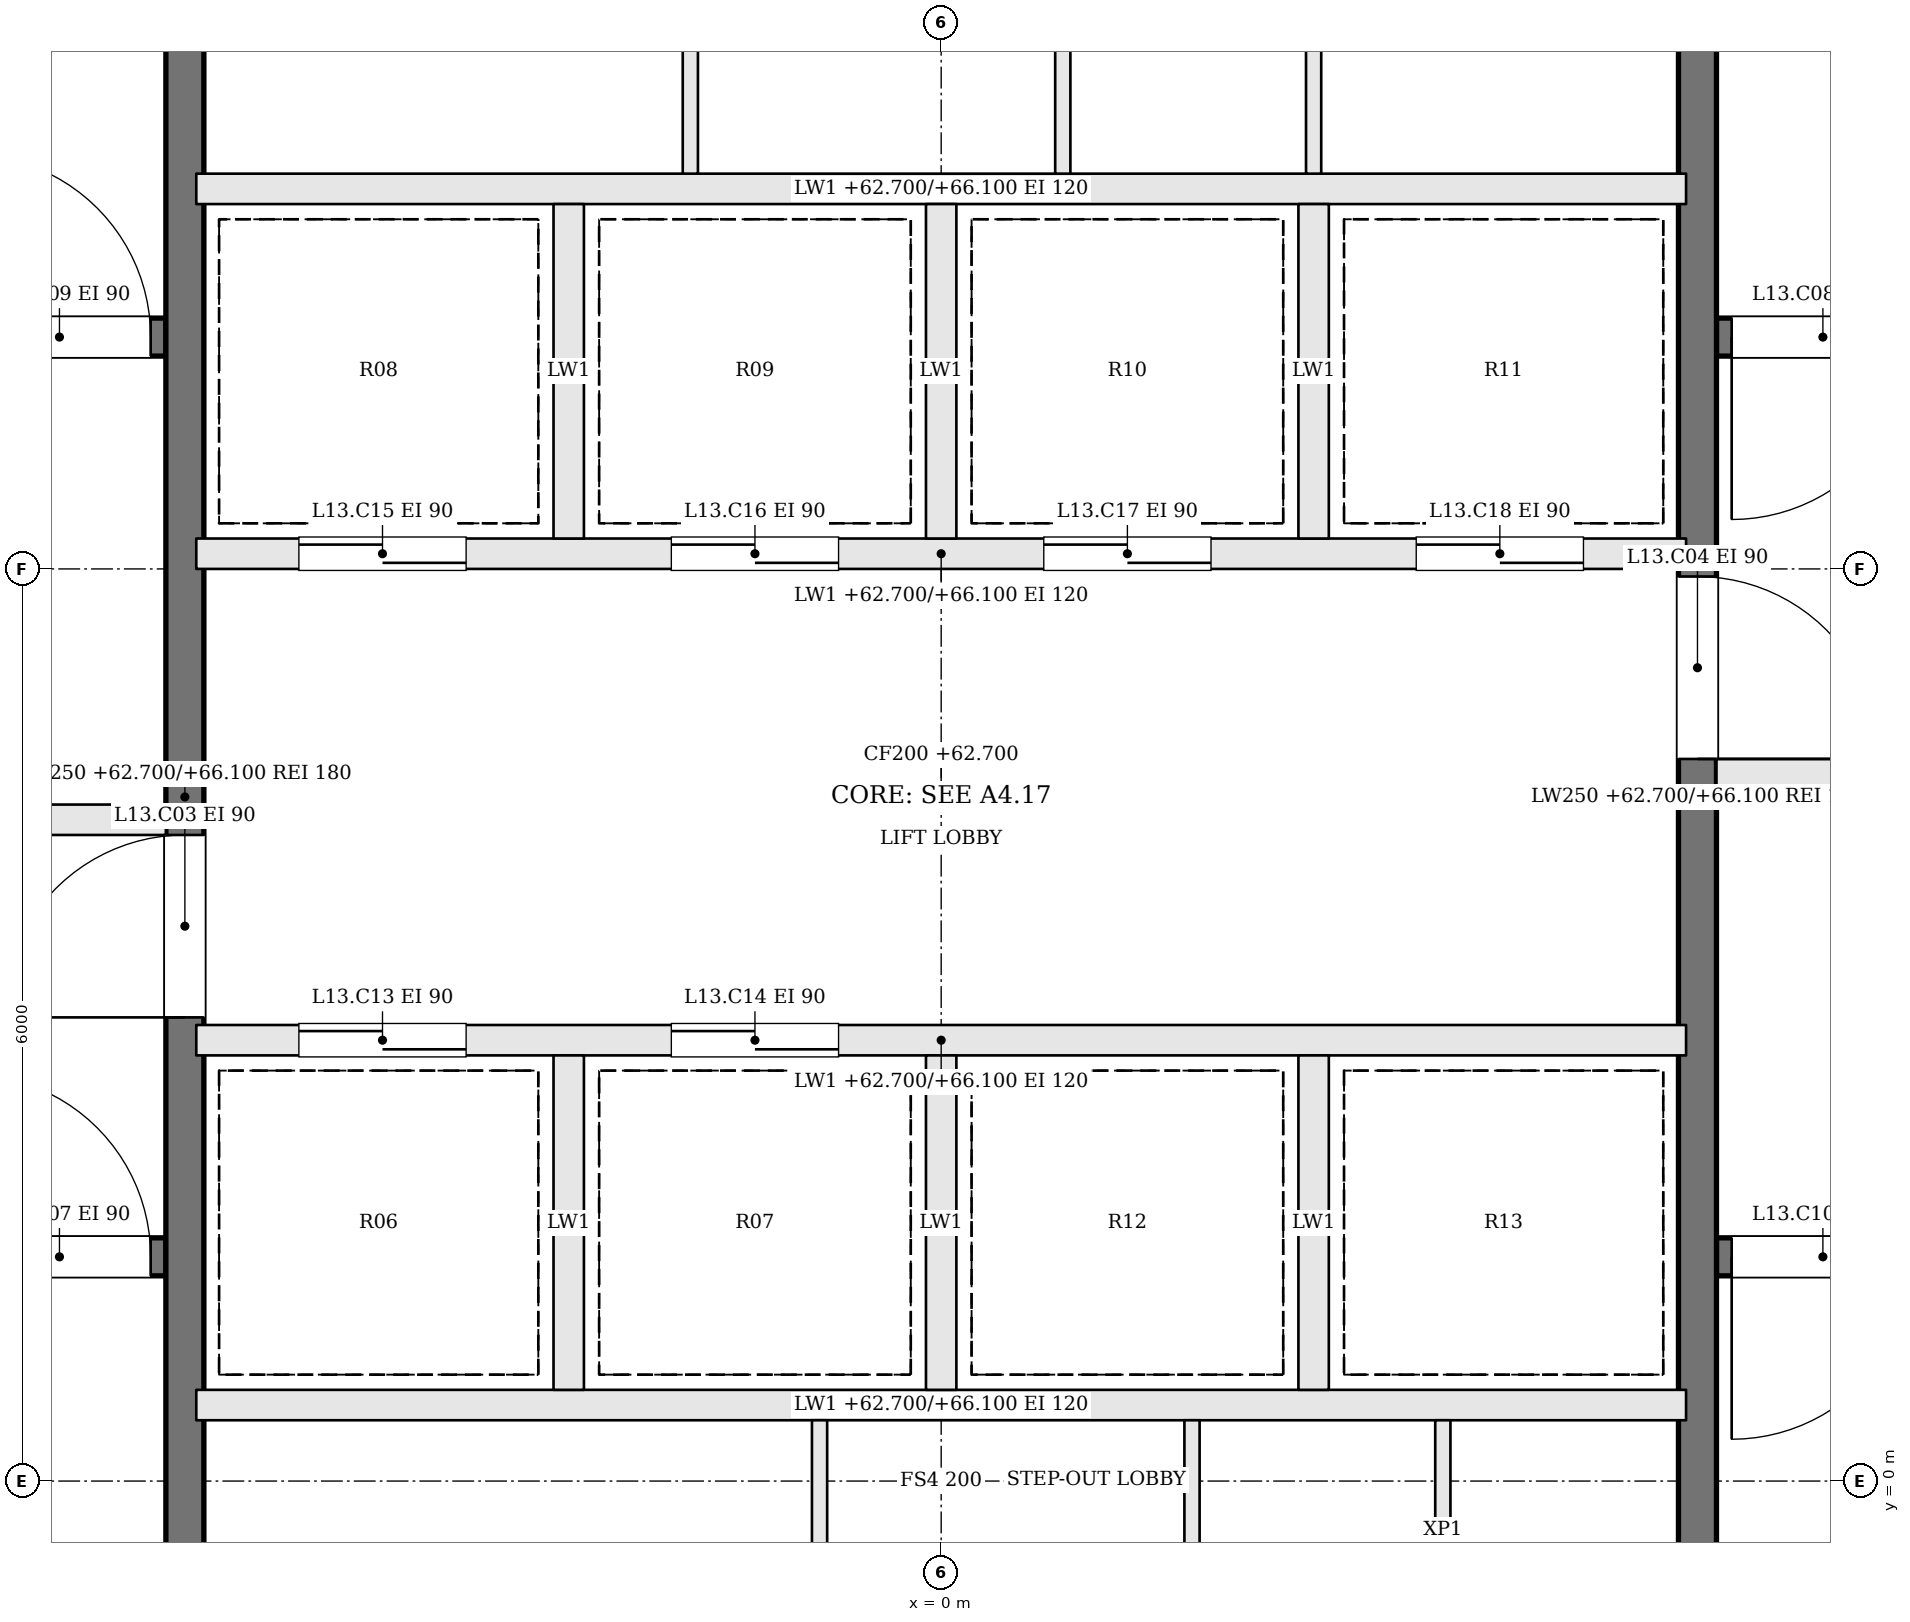
"""IFC4 building model, lengths in metres.
Left out: names, types, materials, properties, quantities, classifications, styles, units other than length and angle.
Written with IfcOpenShell. Run it as: python <this file> out.ifc"""

import sys

from ifc_helpers import new_model, si_unit, direction, frame, frame_2d, origin, place, context, subcontext, project, spatial, rectangle, extrude, element, fill, save


model = new_model("IFC4")
c1 = context("Model", 3, precision=1e-05, world=origin(), true_north=direction((0.0, 1.0)))
c2 = subcontext(c1, "Body", "Model", "MODEL_VIEW")
j1 = project(units=[si_unit("LENGTHUNIT", "METRE"), si_unit("PLANEANGLEUNIT", "RADIAN")], contexts=[c1])
p1 = place(None, origin())
s1 = spatial("IfcSite", under=j1, at=p1, CompositionType="ELEMENT")
p2 = place(p1, origin())
s2 = spatial("IfcBuilding", under=s1, at=p2, CompositionType="ELEMENT")
p3 = place(p2, frame((0.0, 0.0, 62.7)))
s3 = spatial("IfcBuildingStorey", under=s2, at=p3, CompositionType="ELEMENT", Elevation=62.7)
p4 = place(p3, frame((-11.6, 1.475, 0.0), z_axis=(0.0, 0.0, 1.0), x_axis=(1.0, 0.0, 0.0)))
e1 = element("IfcWall", 1, at=p4, inside=s3, PredefinedType="SOLIDWALL", context=c2, shape_type="SweptSolid", body=[
    extrude(rectangle(XDim=6.5, YDim=0.25, at=frame_2d((3.25, 0.0))), origin(), (0.0, 0.0, 1.0), 3.4),
])
p5 = place(p4, frame((5.2, 0.0, 0.0)))
e2 = element("IfcOpeningElement", 2, at=p5, cuts=e1, PredefinedType="OPENING", context=c2, shape_type="SweptSolid", body=[
    extrude(rectangle(XDim=1.2, YDim=2.1, at=frame_2d((0.6, 1.05))), frame((0.0, 0.135, 0.0), z_axis=(0.0, -1.0, 0.0), x_axis=(1.0, 0.0, 0.0)), (0.0, 0.0, 1.0), 0.27),
])
p6 = place(p3, frame((11.6, 7.525, 0.0), z_axis=(0.0, 0.0, 1.0), x_axis=(-1.0, 0.0, 0.0)))
e3 = element("IfcWall", 3, at=p6, inside=s3, PredefinedType="SOLIDWALL", context=c2, shape_type="SweptSolid", body=[
    extrude(rectangle(XDim=6.5, YDim=0.25, at=frame_2d((3.25, 0.0))), origin(), (0.0, 0.0, 1.0), 3.4),
])
p7 = place(p6, frame((5.2, 0.0, 0.0)))
e4 = element("IfcOpeningElement", 4, at=p7, cuts=e3, PredefinedType="OPENING", context=c2, shape_type="SweptSolid", body=[
    extrude(rectangle(XDim=1.2, YDim=2.1, at=frame_2d((0.6, 1.05))), frame((0.0, 0.135, 0.0), z_axis=(0.0, -1.0, 0.0), x_axis=(1.0, 0.0, 0.0)), (0.0, 0.0, 1.0), 0.27),
])
p8 = place(p3, frame((-11.6, 4.35, 0.0), z_axis=(0.0, 0.0, 1.0), x_axis=(1.0, 0.0, 0.0)))
e5 = element("IfcWall", 5, at=p8, inside=s3, PredefinedType="SOLIDWALL", context=c2, shape_type="SweptSolid", body=[
    extrude(rectangle(XDim=6.5, YDim=0.2, at=frame_2d((3.25, 0.0))), origin(), (0.0, 0.0, 1.0), 3.4),
])
p9 = place(p8, frame((3.8, 0.0, 0.0)))
e6 = element("IfcOpeningElement", 6, at=p9, cuts=e5, PredefinedType="OPENING", context=c2, shape_type="SweptSolid", body=[
    extrude(rectangle(XDim=1.2, YDim=2.1, at=frame_2d((0.6, 1.05))), frame((0.0, 0.11, 0.0), z_axis=(0.0, -1.0, 0.0), x_axis=(1.0, 0.0, 0.0)), (0.0, 0.0, 1.0), 0.22),
])
p10 = place(p8, frame((0.5, 0.0, 0.0)))
e7 = element("IfcOpeningElement", 7, at=p10, cuts=e5, PredefinedType="OPENING", context=c2, shape_type="SweptSolid", body=[
    extrude(rectangle(XDim=1.2, YDim=2.1, at=frame_2d((0.6, 1.05))), frame((0.0, 0.11, 0.0), z_axis=(0.0, -1.0, 0.0), x_axis=(1.0, 0.0, 0.0)), (0.0, 0.0, 1.0), 0.22),
])
p11 = place(p3, frame((11.6, 4.65, 0.0), z_axis=(0.0, 0.0, 1.0), x_axis=(-1.0, 0.0, 0.0)))
e8 = element("IfcWall", 8, at=p11, inside=s3, PredefinedType="SOLIDWALL", context=c2, shape_type="SweptSolid", body=[
    extrude(rectangle(XDim=6.5, YDim=0.2, at=frame_2d((3.25, 0.0))), origin(), (0.0, 0.0, 1.0), 3.4),
])
p12 = place(p11, frame((3.8, 0.0, 0.0)))
e9 = element("IfcOpeningElement", 9, at=p12, cuts=e8, PredefinedType="OPENING", context=c2, shape_type="SweptSolid", body=[
    extrude(rectangle(XDim=1.2, YDim=2.1, at=frame_2d((0.6, 1.05))), frame((0.0, 0.11, 0.0), z_axis=(0.0, -1.0, 0.0), x_axis=(1.0, 0.0, 0.0)), (0.0, 0.0, 1.0), 0.22),
])
p13 = place(p11, frame((0.5, 0.0, 0.0)))
e10 = element("IfcOpeningElement", 10, at=p13, cuts=e8, PredefinedType="OPENING", context=c2, shape_type="SweptSolid", body=[
    extrude(rectangle(XDim=1.2, YDim=2.1, at=frame_2d((0.6, 1.05))), frame((0.0, 0.11, 0.0), z_axis=(0.0, -1.0, 0.0), x_axis=(1.0, 0.0, 0.0)), (0.0, 0.0, 1.0), 0.22),
])
p14 = place(p3, frame((-11.6, 7.525, 0.0), z_axis=(0.0, 0.0, 1.0), x_axis=(1.0, 0.0, 0.0)))
e11 = element("IfcWall", 11, at=p14, inside=s3, PredefinedType="SOLIDWALL", context=c2, shape_type="SweptSolid", body=[
    extrude(rectangle(XDim=6.5, YDim=0.25, at=frame_2d((3.25, 0.0))), origin(), (0.0, 0.0, 1.0), 3.4),
])
p15 = place(p14, frame((5.2, 0.0, 0.0)))
e12 = element("IfcOpeningElement", 12, at=p15, cuts=e11, PredefinedType="OPENING", context=c2, shape_type="SweptSolid", body=[
    extrude(rectangle(XDim=1.2, YDim=2.1, at=frame_2d((0.6, 1.05))), frame((0.0, 0.135, 0.0), z_axis=(0.0, -1.0, 0.0), x_axis=(1.0, 0.0, 0.0)), (0.0, 0.0, 1.0), 0.27),
])
p16 = place(p3, frame((11.6, 1.475, 0.0), z_axis=(0.0, 0.0, 1.0), x_axis=(-1.0, 0.0, 0.0)))
e13 = element("IfcWall", 13, at=p16, inside=s3, PredefinedType="SOLIDWALL", context=c2, shape_type="SweptSolid", body=[
    extrude(rectangle(XDim=6.5, YDim=0.25, at=frame_2d((3.25, 0.0))), origin(), (0.0, 0.0, 1.0), 3.4),
])
p17 = place(p16, frame((5.2, 0.0, 0.0)))
e14 = element("IfcOpeningElement", 14, at=p17, cuts=e13, PredefinedType="OPENING", context=c2, shape_type="SweptSolid", body=[
    extrude(rectangle(XDim=1.2, YDim=2.1, at=frame_2d((0.6, 1.05))), frame((0.0, 0.135, 0.0), z_axis=(0.0, -1.0, 0.0), x_axis=(1.0, 0.0, 0.0)), (0.0, 0.0, 1.0), 0.27),
])
p18 = place(p3, frame((-4.975, -1.6, 0.0), z_axis=(0.0, 0.0, 1.0), x_axis=(0.0, 1.0, 0.0)))
e15 = element("IfcWall", 15, at=p18, inside=s3, PredefinedType="SOLIDWALL", context=c2, shape_type="SweptSolid", body=[
    extrude(rectangle(XDim=12.2, YDim=0.25, at=frame_2d((6.1, 0.0))), origin(), (0.0, 0.0, 1.0), 3.4),
])
p19 = place(p18, frame((4.65, 0.0, 0.0)))
e16 = element("IfcOpeningElement", 16, at=p19, cuts=e15, PredefinedType="OPENING", context=c2, shape_type="SweptSolid", body=[
    extrude(rectangle(XDim=1.2, YDim=2.1, at=frame_2d((0.6, 1.05))), frame((0.0, 0.135, 0.0), z_axis=(0.0, -1.0, 0.0), x_axis=(1.0, 0.0, 0.0)), (0.0, 0.0, 1.0), 0.27),
])
p20 = place(p3, frame((4.975, 10.6, 0.0), z_axis=(0.0, 0.0, 1.0), x_axis=(0.0, -1.0, 0.0)))
e17 = element("IfcWall", 17, at=p20, inside=s3, PredefinedType="SOLIDWALL", context=c2, shape_type="SweptSolid", body=[
    extrude(rectangle(XDim=12.2, YDim=0.25, at=frame_2d((6.1, 0.0))), origin(), (0.0, 0.0, 1.0), 3.4),
])
p21 = place(p20, frame((4.65, 0.0, 0.0)))
e18 = element("IfcOpeningElement", 18, at=p21, cuts=e17, PredefinedType="OPENING", context=c2, shape_type="SweptSolid", body=[
    extrude(rectangle(XDim=1.2, YDim=2.1, at=frame_2d((0.6, 1.05))), frame((0.0, 0.135, 0.0), z_axis=(0.0, -1.0, 0.0), x_axis=(1.0, 0.0, 0.0)), (0.0, 0.0, 1.0), 0.27),
])
p22 = place(p3, frame((-4.9, 0.5, 0.0), z_axis=(0.0, 0.0, 1.0), x_axis=(1.0, 0.0, 0.0)))
e19 = element("IfcWall", 19, at=p22, inside=s3, PredefinedType="SOLIDWALL", context=c2, shape_type="SweptSolid", body=[
    extrude(rectangle(XDim=9.8, YDim=0.2, at=frame_2d((4.9, 0.0))), origin(), (0.0, 0.0, 1.0), 3.4),
])
p23 = place(p3, frame((-4.9, 2.9, 0.0), z_axis=(0.0, 0.0, 1.0), x_axis=(1.0, 0.0, 0.0)))
e20 = element("IfcWall", 20, at=p23, inside=s3, PredefinedType="SOLIDWALL", context=c2, shape_type="SweptSolid", body=[
    extrude(rectangle(XDim=9.8, YDim=0.2, at=frame_2d((4.9, 0.0))), origin(), (0.0, 0.0, 1.0), 3.4),
])
p24 = place(p23, frame((0.675, 0.0, 0.0)))
e21 = element("IfcOpeningElement", 21, at=p24, cuts=e20, PredefinedType="OPENING", context=c2, shape_type="SweptSolid", body=[
    extrude(rectangle(XDim=1.1, YDim=2.1, at=frame_2d((0.55, 1.05))), frame((0.0, 0.11, 0.0), z_axis=(0.0, -1.0, 0.0), x_axis=(1.0, 0.0, 0.0)), (0.0, 0.0, 1.0), 0.22),
])
p25 = place(p23, frame((3.125, 0.0, 0.0)))
e22 = element("IfcOpeningElement", 22, at=p25, cuts=e20, PredefinedType="OPENING", context=c2, shape_type="SweptSolid", body=[
    extrude(rectangle(XDim=1.1, YDim=2.1, at=frame_2d((0.55, 1.05))), frame((0.0, 0.11, 0.0), z_axis=(0.0, -1.0, 0.0), x_axis=(1.0, 0.0, 0.0)), (0.0, 0.0, 1.0), 0.22),
])
p26 = place(p3, frame((-4.9, 6.1, 0.0), z_axis=(0.0, 0.0, 1.0), x_axis=(1.0, 0.0, 0.0)))
e23 = element("IfcWall", 23, at=p26, inside=s3, PredefinedType="SOLIDWALL", context=c2, shape_type="SweptSolid", body=[
    extrude(rectangle(XDim=9.8, YDim=0.2, at=frame_2d((4.9, 0.0))), origin(), (0.0, 0.0, 1.0), 3.4),
])
p27 = place(p26, frame((0.675, 0.0, 0.0)))
e24 = element("IfcOpeningElement", 24, at=p27, cuts=e23, PredefinedType="OPENING", context=c2, shape_type="SweptSolid", body=[
    extrude(rectangle(XDim=1.1, YDim=2.1, at=frame_2d((0.55, 1.05))), frame((0.0, 0.11, 0.0), z_axis=(0.0, -1.0, 0.0), x_axis=(1.0, 0.0, 0.0)), (0.0, 0.0, 1.0), 0.22),
])
p28 = place(p26, frame((3.125, 0.0, 0.0)))
e25 = element("IfcOpeningElement", 25, at=p28, cuts=e23, PredefinedType="OPENING", context=c2, shape_type="SweptSolid", body=[
    extrude(rectangle(XDim=1.1, YDim=2.1, at=frame_2d((0.55, 1.05))), frame((0.0, 0.11, 0.0), z_axis=(0.0, -1.0, 0.0), x_axis=(1.0, 0.0, 0.0)), (0.0, 0.0, 1.0), 0.22),
])
p29 = place(p26, frame((5.575, 0.0, 0.0)))
e26 = element("IfcOpeningElement", 26, at=p29, cuts=e23, PredefinedType="OPENING", context=c2, shape_type="SweptSolid", body=[
    extrude(rectangle(XDim=1.1, YDim=2.1, at=frame_2d((0.55, 1.05))), frame((0.0, 0.11, 0.0), z_axis=(0.0, -1.0, 0.0), x_axis=(1.0, 0.0, 0.0)), (0.0, 0.0, 1.0), 0.22),
])
p30 = place(p26, frame((8.025, 0.0, 0.0)))
e27 = element("IfcOpeningElement", 27, at=p30, cuts=e23, PredefinedType="OPENING", context=c2, shape_type="SweptSolid", body=[
    extrude(rectangle(XDim=1.1, YDim=2.1, at=frame_2d((0.55, 1.05))), frame((0.0, 0.11, 0.0), z_axis=(0.0, -1.0, 0.0), x_axis=(1.0, 0.0, 0.0)), (0.0, 0.0, 1.0), 0.22),
])
p31 = place(p3, frame((-4.9, 8.5, 0.0), z_axis=(0.0, 0.0, 1.0), x_axis=(1.0, 0.0, 0.0)))
e28 = element("IfcWall", 28, at=p31, inside=s3, PredefinedType="SOLIDWALL", context=c2, shape_type="SweptSolid", body=[
    extrude(rectangle(XDim=9.8, YDim=0.2, at=frame_2d((4.9, 0.0))), origin(), (0.0, 0.0, 1.0), 3.4),
])
for number, where, z_axis, x_axis in (
    (29, (-2.45, 0.6, 0.0), (0.0, 0.0, 1.0), (0.0, 1.0, 0.0)),
    (30, (0.0, 0.6, 0.0), (0.0, 0.0, 1.0), (0.0, 1.0, 0.0)),
    (31, (2.45, 0.6, 0.0), (0.0, 0.0, 1.0), (0.0, 1.0, 0.0)),
    (32, (-2.45, 6.2, 0.0), (0.0, 0.0, 1.0), (0.0, 1.0, 0.0)),
    (33, (0.0, 6.2, 0.0), (0.0, 0.0, 1.0), (0.0, 1.0, 0.0)),
    (34, (2.45, 6.2, 0.0), (0.0, 0.0, 1.0), (0.0, 1.0, 0.0)),
):
    element("IfcWall", number, at=place(p3, frame(where, z_axis=z_axis, x_axis=x_axis)), inside=s3, PredefinedType="SOLIDWALL", context=c2, shape_type="SweptSolid", body=[
        extrude(rectangle(XDim=2.2, YDim=0.2, at=frame_2d((1.1, 0.0))), origin(), (0.0, 0.0, 1.0), 3.4),
    ])
for number, where, z_axis, x_axis in (
    (35, (-0.8, -1.6, 0.0), (0.0, 0.0, 1.0), (0.0, 1.0, 0.0)),
    (36, (1.65, -1.6, 0.0), (0.0, 0.0, 1.0), (0.0, 1.0, 0.0)),
    (37, (3.3, -1.6, 0.0), (0.0, 0.0, 1.0), (0.0, 1.0, 0.0)),
    (38, (-1.65, 8.6, 0.0), (0.0, 0.0, 1.0), (0.0, 1.0, 0.0)),
    (39, (0.8, 8.6, 0.0), (0.0, 0.0, 1.0), (0.0, 1.0, 0.0)),
    (40, (2.45, 8.6, 0.0), (0.0, 0.0, 1.0), (0.0, 1.0, 0.0)),
):
    element("IfcWall", number, at=place(p3, frame(where, z_axis=z_axis, x_axis=x_axis)), inside=s3, PredefinedType="PARTITIONING", context=c2, shape_type="SweptSolid", body=[
        extrude(rectangle(XDim=2.0, YDim=0.1, at=frame_2d((1.0, 0.0))), origin(), (0.0, 0.0, 1.0), 3.4),
    ])
p32 = place(p19, origin())
e41 = element("IfcDoor", 41, at=p32, inside=s3, OperationType="SINGLE_SWING_LEFT", PredefinedType="DOOR", context=c2, shape_type="SweptSolid", body=[
    extrude(rectangle(XDim=1.2, YDim=2.1, at=frame_2d((0.6, 1.05))), frame((0.0, 0.025, 0.0), z_axis=(0.0, -1.0, 0.0), x_axis=(1.0, 0.0, 0.0)), (0.0, 0.0, 1.0), 0.05),
])
fill(e16, e41)
p33 = place(p21, origin())
e42 = element("IfcDoor", 42, at=p33, inside=s3, OperationType="SINGLE_SWING_RIGHT", PredefinedType="DOOR", context=c2, shape_type="SweptSolid", body=[
    extrude(rectangle(XDim=1.2, YDim=2.1, at=frame_2d((0.6, 1.05))), frame((0.0, 0.025, 0.0), z_axis=(0.0, -1.0, 0.0), x_axis=(1.0, 0.0, 0.0)), (0.0, 0.0, 1.0), 0.05),
])
fill(e18, e42)
p34 = place(p5, origin())
e43 = element("IfcDoor", 43, at=p34, inside=s3, OperationType="SINGLE_SWING_LEFT", PredefinedType="DOOR", context=c2, shape_type="SweptSolid", body=[
    extrude(rectangle(XDim=1.2, YDim=2.1, at=frame_2d((0.6, 1.05))), frame((0.0, 0.025, 0.0), z_axis=(0.0, -1.0, 0.0), x_axis=(1.0, 0.0, 0.0)), (0.0, 0.0, 1.0), 0.05),
])
fill(e2, e43)
p35 = place(p7, origin())
e44 = element("IfcDoor", 44, at=p35, inside=s3, OperationType="SINGLE_SWING_RIGHT", PredefinedType="DOOR", context=c2, shape_type="SweptSolid", body=[
    extrude(rectangle(XDim=1.2, YDim=2.1, at=frame_2d((0.6, 1.05))), frame((0.0, 0.025, 0.0), z_axis=(0.0, -1.0, 0.0), x_axis=(1.0, 0.0, 0.0)), (0.0, 0.0, 1.0), 0.05),
])
fill(e4, e44)
p36 = place(p15, origin())
e45 = element("IfcDoor", 45, at=p36, inside=s3, OperationType="SINGLE_SWING_LEFT", PredefinedType="DOOR", context=c2, shape_type="SweptSolid", body=[
    extrude(rectangle(XDim=1.2, YDim=2.1, at=frame_2d((0.6, 1.05))), frame((0.0, 0.025, 0.0), z_axis=(0.0, -1.0, 0.0), x_axis=(1.0, 0.0, 0.0)), (0.0, 0.0, 1.0), 0.05),
])
fill(e12, e45)
p37 = place(p17, origin())
e46 = element("IfcDoor", 46, at=p37, inside=s3, OperationType="SINGLE_SWING_RIGHT", PredefinedType="DOOR", context=c2, shape_type="SweptSolid", body=[
    extrude(rectangle(XDim=1.2, YDim=2.1, at=frame_2d((0.6, 1.05))), frame((0.0, 0.025, 0.0), z_axis=(0.0, -1.0, 0.0), x_axis=(1.0, 0.0, 0.0)), (0.0, 0.0, 1.0), 0.05),
])
fill(e14, e46)
p38 = place(p24, origin())
e47 = element("IfcDoor", 47, at=p38, inside=s3, OperationType="SLIDING_TO_RIGHT", PredefinedType="DOOR", context=c2, shape_type="SweptSolid", body=[
    extrude(rectangle(XDim=1.1, YDim=2.1, at=frame_2d((0.55, 1.05))), frame((0.0, 0.025, 0.0), z_axis=(0.0, -1.0, 0.0), x_axis=(1.0, 0.0, 0.0)), (0.0, 0.0, 1.0), 0.05),
])
fill(e21, e47)
p39 = place(p25, origin())
e48 = element("IfcDoor", 48, at=p39, inside=s3, OperationType="SLIDING_TO_LEFT", PredefinedType="DOOR", context=c2, shape_type="SweptSolid", body=[
    extrude(rectangle(XDim=1.1, YDim=2.1, at=frame_2d((0.55, 1.05))), frame((0.0, 0.025, 0.0), z_axis=(0.0, -1.0, 0.0), x_axis=(1.0, 0.0, 0.0)), (0.0, 0.0, 1.0), 0.05),
])
fill(e22, e48)
p40 = place(p27, origin())
e49 = element("IfcDoor", 49, at=p40, inside=s3, OperationType="SLIDING_TO_RIGHT", PredefinedType="DOOR", context=c2, shape_type="SweptSolid", body=[
    extrude(rectangle(XDim=1.1, YDim=2.1, at=frame_2d((0.55, 1.05))), frame((0.0, 0.025, 0.0), z_axis=(0.0, -1.0, 0.0), x_axis=(1.0, 0.0, 0.0)), (0.0, 0.0, 1.0), 0.05),
])
fill(e24, e49)
p41 = place(p28, origin())
e50 = element("IfcDoor", 50, at=p41, inside=s3, OperationType="SLIDING_TO_LEFT", PredefinedType="DOOR", context=c2, shape_type="SweptSolid", body=[
    extrude(rectangle(XDim=1.1, YDim=2.1, at=frame_2d((0.55, 1.05))), frame((0.0, 0.025, 0.0), z_axis=(0.0, -1.0, 0.0), x_axis=(1.0, 0.0, 0.0)), (0.0, 0.0, 1.0), 0.05),
])
fill(e25, e50)
p42 = place(p29, origin())
e51 = element("IfcDoor", 51, at=p42, inside=s3, OperationType="SLIDING_TO_RIGHT", PredefinedType="DOOR", context=c2, shape_type="SweptSolid", body=[
    extrude(rectangle(XDim=1.1, YDim=2.1, at=frame_2d((0.55, 1.05))), frame((0.0, 0.025, 0.0), z_axis=(0.0, -1.0, 0.0), x_axis=(1.0, 0.0, 0.0)), (0.0, 0.0, 1.0), 0.05),
])
fill(e26, e51)
p43 = place(p30, origin())
e52 = element("IfcDoor", 52, at=p43, inside=s3, OperationType="SLIDING_TO_LEFT", PredefinedType="DOOR", context=c2, shape_type="SweptSolid", body=[
    extrude(rectangle(XDim=1.1, YDim=2.1, at=frame_2d((0.55, 1.05))), frame((0.0, 0.025, 0.0), z_axis=(0.0, -1.0, 0.0), x_axis=(1.0, 0.0, 0.0)), (0.0, 0.0, 1.0), 0.05),
])
fill(e27, e52)
save(model, sys.argv[1])
